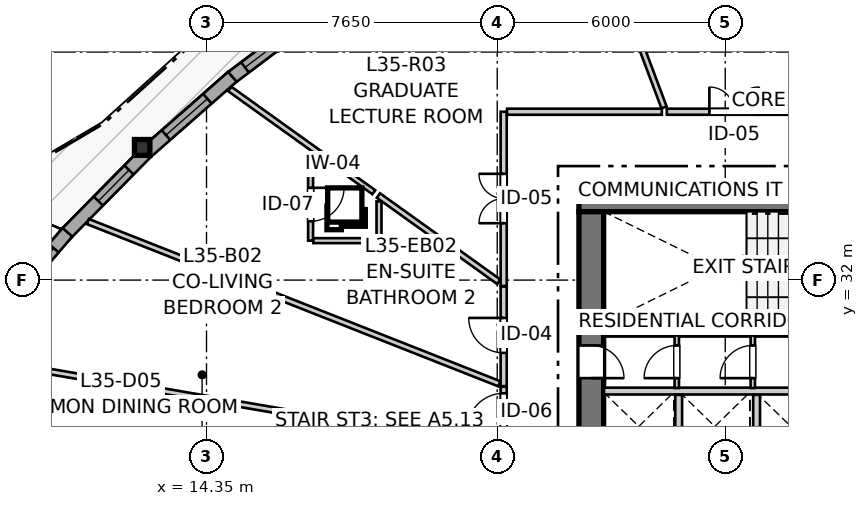
"""IFC4 building model, lengths in metres.
Left out: names, types, materials, properties, quantities, classifications, styles, units other than length and angle.
Written with IfcOpenShell. Run it as: python <this file> out.ifc"""

import sys

from ifc_helpers import new_model, si_unit, direction, frame, frame_2d, origin, origin_2d, place, context, subcontext, project, spatial, rectangle, i_section, extrude, source, transform, mapped, element, fill, save


model = new_model("IFC4")
c1 = context("Model", 3, precision=1e-05, world=origin(), true_north=direction((0.0, 1.0)))
c2 = subcontext(c1, "Body", "Model", "MODEL_VIEW")
j1 = project(units=[si_unit("LENGTHUNIT", "METRE"), si_unit("PLANEANGLEUNIT", "RADIAN")], contexts=[c1])
p1 = place(None, origin())
s1 = spatial("IfcSite", under=j1, at=p1, CompositionType="ELEMENT")
p2 = place(p1, origin())
s2 = spatial("IfcBuilding", under=s1, at=p2, CompositionType="ELEMENT")
p3 = place(p2, frame((0.0, 0.0, 118.4)))
s3 = spatial("IfcBuildingStorey", under=s2, at=p3, CompositionType="ELEMENT", Elevation=118.4)
p4 = place(p3, frame((36.55, 34.125, 0.0), z_axis=(0.0, 0.0, 1.0), x_axis=(-1.0, 0.0, 0.0)))
e1 = element("IfcWall", 1, at=p4, inside=s3, PredefinedType="SHEAR", context=c2, shape_type="SweptSolid", body=[
    extrude(rectangle(XDim=12.4, YDim=0.65, at=frame_2d((6.2, 0.0))), origin(), (0.0, 0.0, 1.0), 2.95),
])
p5 = place(p3, frame((24.475, 33.8, 0.0), z_axis=(0.0, 0.0, 1.0), x_axis=(0.0, -1.0, 0.0)))
e2 = element("IfcWall", 2, at=p5, inside=s3, PredefinedType="SHEAR", context=c2, shape_type="SweptSolid", body=[
    extrude(rectangle(XDim=15.6, YDim=0.65, at=frame_2d((7.8, 0.0))), origin(), (0.0, 0.0, 1.0), 2.95),
])
p6 = place(p5, frame((7.05, 0.0, 0.0)))
e3 = element("IfcOpeningElement", 3, at=p6, cuts=e2, PredefinedType="OPENING", context=c2, shape_type="SweptSolid", body=[
    extrude(rectangle(XDim=1.5, YDim=2.15, at=frame_2d((0.75, 1.075))), frame((0.0, 0.335, 0.0), z_axis=(0.0, -1.0, 0.0), x_axis=(1.0, 0.0, 0.0)), (0.0, 0.0, 1.0), 0.67),
])
p7 = place(p5, frame((3.52, 0.0, 0.0)))
e4 = element("IfcOpeningElement", 4, at=p7, cuts=e2, PredefinedType="OPENING", context=c2, shape_type="SweptSolid", body=[
    extrude(rectangle(XDim=0.86, YDim=2.05, at=frame_2d((0.43, 1.025))), frame((0.0, 0.335, 0.0), z_axis=(0.0, -1.0, 0.0), x_axis=(1.0, 0.0, 0.0)), (0.0, 0.0, 1.0), 0.67),
])
p8 = place(p5, frame((11.22, 0.0, 0.0)))
e5 = element("IfcOpeningElement", 5, at=p8, cuts=e2, PredefinedType="OPENING", context=c2, shape_type="SweptSolid", body=[
    extrude(rectangle(XDim=0.86, YDim=2.05, at=frame_2d((0.43, 1.025))), frame((0.0, 0.335, 0.0), z_axis=(0.0, -1.0, 0.0), x_axis=(1.0, 0.0, 0.0)), (0.0, 0.0, 1.0), 0.67),
])
p9 = place(p3, frame((24.8, 30.7, 0.0), z_axis=(0.0, 0.0, 1.0), x_axis=(1.0, 0.0, 0.0)))
e6 = element("IfcWall", 6, at=p9, inside=s3, PredefinedType="SHEAR", context=c2, shape_type="SweptSolid", body=[
    extrude(rectangle(XDim=11.1, YDim=0.3, at=frame_2d((5.55, 0.0))), origin(), (0.0, 0.0, 1.0), 2.95),
])
p10 = place(p9, frame((6.22, 0.0, 0.0)))
e7 = element("IfcOpeningElement", 7, at=p10, cuts=e6, PredefinedType="OPENING", context=c2, shape_type="SweptSolid", body=[
    extrude(rectangle(XDim=0.98, YDim=2.15, at=frame_2d((0.49, 1.075))), frame((0.0, 0.16, 0.0), z_axis=(0.0, -1.0, 0.0), x_axis=(1.0, 0.0, 0.0)), (0.0, 0.0, 1.0), 0.32),
])
p11 = place(p9, frame((9.15, 0.0, 0.0)))
e8 = element("IfcOpeningElement", 8, at=p11, cuts=e6, PredefinedType="OPENING", context=c2, shape_type="SweptSolid", body=[
    extrude(rectangle(XDim=1.15, YDim=2.15, at=frame_2d((0.575, 1.075))), frame((0.0, 0.16, 0.0), z_axis=(0.0, -1.0, 0.0), x_axis=(1.0, 0.0, 0.0)), (0.0, 0.0, 1.0), 0.32),
])
m1 = source(origin(), c2, "Body", "SweptSolid", [
    extrude(i_section(OverallWidth=0.406, OverallDepth=0.416, WebThickness=0.027, FlangeThickness=0.044, FilletRadius=0.015, at=origin_2d()), origin(), (0.0, 0.0, 1.0), 2.95),
])
p12 = place(p3, frame((12.657, 35.491, 0.0), z_axis=(0.0, 0.0, 1.0), x_axis=(1.0, 0.0, 0.0)))
e9 = element("IfcColumn", 9, at=p12, inside=s3, PredefinedType="PILASTER", context=c2, shape_type="MappedRepresentation", body=[
    mapped(m1, transform((0.0, 0.0, 0.0), x_axis=(1.0, 0.0, 0.0), y_axis=(0.0, 1.0, 0.0), z_axis=(0.0, 0.0, 1.0), scale=1.0)),
])
p13 = place(p3, frame((17.154, 38.947, 0.0), z_axis=(0.0, 0.0, 1.0), x_axis=(-0.798332692302, -0.602216665663, 0.0)))
e10 = element("IfcWall", 10, at=p13, inside=s3, PredefinedType="SOLIDWALL", context=c2, shape_type="SweptSolid", body=[
    extrude(rectangle(XDim=2.746, YDim=0.34, at=frame_2d((1.373, 0.0))), origin(), (0.0, 0.0, 1.0), 2.48),
])
p14 = place(p13, frame((0.493, 0.0, 0.82)))
e11 = element("IfcOpeningElement", 11, at=p14, cuts=e10, PredefinedType="OPENING", context=c2, shape_type="SweptSolid", body=[
    extrude(rectangle(XDim=1.75, YDim=1.3, at=frame_2d((0.875, 0.65))), frame((0.0, 0.18, 0.0), z_axis=(0.0, -1.0, 0.0), x_axis=(1.0, 0.0, 0.0)), (0.0, 0.0, 1.0), 0.36),
])
p15 = place(p3, frame((15.031, 37.349, 0.0), z_axis=(0.0, 0.0, 1.0), x_axis=(-0.751472812955, -0.659764057364, 0.0)))
e12 = element("IfcWall", 12, at=p15, inside=s3, PredefinedType="SOLIDWALL", context=c2, shape_type="SweptSolid", body=[
    extrude(rectangle(XDim=2.99, YDim=0.34, at=frame_2d((1.495, 0.0))), origin(), (0.0, 0.0, 1.0), 2.48),
])
p16 = place(p15, frame((0.875, 0.0, 0.82)))
e13 = element("IfcOpeningElement", 13, at=p16, cuts=e12, PredefinedType="OPENING", context=c2, shape_type="SweptSolid", body=[
    extrude(rectangle(XDim=1.45, YDim=1.25, at=frame_2d((0.725, 0.625))), frame((0.0, 0.18, 0.0), z_axis=(0.0, -1.0, 0.0), x_axis=(1.0, 0.0, 0.0)), (0.0, 0.0, 1.0), 0.36),
])
p17 = place(p3, frame((12.764, 35.357, 0.0), z_axis=(0.0, 0.0, 1.0), x_axis=(-0.701906045867, -0.712269543625, 0.0)))
e14 = element("IfcWall", 14, at=p17, inside=s3, PredefinedType="SOLIDWALL", context=c2, shape_type="SweptSolid", body=[
    extrude(rectangle(XDim=3.039, YDim=0.34, at=frame_2d((1.52, 0.0))), origin(), (0.0, 0.0, 1.0), 2.48),
])
p18 = place(p17, frame((0.646, 0.0, 0.82)))
e15 = element("IfcOpeningElement", 15, at=p18, cuts=e14, PredefinedType="OPENING", context=c2, shape_type="SweptSolid", body=[
    extrude(rectangle(XDim=1.15, YDim=1.2, at=frame_2d((0.575, 0.6))), frame((0.0, 0.18, 0.0), z_axis=(0.0, -1.0, 0.0), x_axis=(1.0, 0.0, 0.0)), (0.0, 0.0, 1.0), 0.36),
])
p19 = place(p3, frame((10.69, 33.257, 0.0), z_axis=(0.0, 0.0, 1.0), x_axis=(-0.650763576187, -0.759280427714, 0.0)))
e16 = element("IfcWall", 16, at=p19, inside=s3, PredefinedType="SOLIDWALL", context=c2, shape_type="SweptSolid", body=[
    extrude(rectangle(XDim=2.893, YDim=0.34, at=frame_2d((1.447, 0.0))), origin(), (0.0, 0.0, 1.0), 2.48),
])
p20 = place(p19, frame((0.552, 0.0, 0.82)))
e17 = element("IfcOpeningElement", 17, at=p20, cuts=e16, PredefinedType="OPENING", context=c2, shape_type="SweptSolid", body=[
    extrude(rectangle(XDim=1.8, YDim=1.45, at=frame_2d((0.9, 0.725))), frame((0.0, 0.18, 0.0), z_axis=(0.0, -1.0, 0.0), x_axis=(1.0, 0.0, 0.0)), (0.0, 0.0, 1.0), 0.36),
])
p21 = place(p3, frame((24.81, 29.08, 0.0), z_axis=(0.0, 0.0, 1.0), x_axis=(1.0, 0.0, 0.0)))
e18 = element("IfcWall", 18, at=p21, inside=s3, PredefinedType="PARTITIONING", context=c2, shape_type="SweptSolid", body=[
    extrude(rectangle(XDim=5.84, YDim=0.18, at=frame_2d((2.92, 0.0))), origin(), (0.0, 0.0, 1.0), 2.95),
])
for number, where, z_axis, x_axis in (
    (19, (26.775, 27.2, 0.0), (0.0, 0.0, 1.0), (0.0, 1.0, 0.0)),
    (20, (28.825, 27.2, 0.0), (0.0, 0.0, 1.0), (0.0, 1.0, 0.0)),
):
    element("IfcWall", number, at=place(p3, frame(where, z_axis=z_axis, x_axis=x_axis)), inside=s3, PredefinedType="PARTITIONING", context=c2, shape_type="SweptSolid", body=[
        extrude(rectangle(XDim=1.78, YDim=0.18, at=frame_2d((0.89, 0.0))), origin(), (0.0, 0.0, 1.0), 2.95),
    ])
p22 = place(p3, frame((26.725, 29.16, 0.0), z_axis=(0.0, 0.0, 1.0), x_axis=(0.0, 1.0, 0.0)))
e21 = element("IfcWall", 21, at=p22, inside=s3, PredefinedType="PARTITIONING", context=c2, shape_type="SweptSolid", body=[
    extrude(rectangle(XDim=1.38, YDim=0.115, at=frame_2d((0.69, 0.0))), origin(), (0.0, 0.0, 1.0), 2.95),
])
p23 = place(p22, frame((0.26, 0.0, 0.0)))
e22 = element("IfcOpeningElement", 22, at=p23, cuts=e21, PredefinedType="OPENING", context=c2, shape_type="SweptSolid", body=[
    extrude(rectangle(XDim=0.86, YDim=2.05, at=frame_2d((0.43, 1.025))), frame((0.0, 0.067, 0.0), z_axis=(0.0, -1.0, 0.0), x_axis=(1.0, 0.0, 0.0)), (0.0, 0.0, 1.0), 0.135),
])
p24 = place(p3, frame((28.725, 29.16, 0.0), z_axis=(0.0, 0.0, 1.0), x_axis=(0.0, 1.0, 0.0)))
e23 = element("IfcWall", 23, at=p24, inside=s3, PredefinedType="PARTITIONING", context=c2, shape_type="SweptSolid", body=[
    extrude(rectangle(XDim=1.38, YDim=0.115, at=frame_2d((0.69, 0.0))), origin(), (0.0, 0.0, 1.0), 2.95),
])
p25 = place(p24, frame((0.26, 0.0, 0.0)))
e24 = element("IfcOpeningElement", 24, at=p25, cuts=e23, PredefinedType="OPENING", context=c2, shape_type="SweptSolid", body=[
    extrude(rectangle(XDim=0.86, YDim=2.05, at=frame_2d((0.43, 1.025))), frame((0.0, 0.067, 0.0), z_axis=(0.0, -1.0, 0.0), x_axis=(1.0, 0.0, 0.0)), (0.0, 0.0, 1.0), 0.135),
])
p26 = place(p3, frame((22.17, 31.844, 0.0), z_axis=(0.0, 0.0, 1.0), x_axis=(0.0, 1.0, 0.0)))
e25 = element("IfcWall", 25, at=p26, inside=s3, PredefinedType="PARTITIONING", context=c2, shape_type="SweptSolid", body=[
    extrude(rectangle(XDim=4.586, YDim=0.16, at=frame_2d((2.293, 0.0))), origin(), (0.0, 0.0, 1.0), 2.95),
])
p27 = place(p26, frame((1.653, 0.0, 0.0)))
e26 = element("IfcOpeningElement", 26, at=p27, cuts=e25, PredefinedType="OPENING", context=c2, shape_type="SweptSolid", body=[
    extrude(rectangle(XDim=1.3, YDim=2.1, at=frame_2d((0.65, 1.05))), frame((0.0, 0.09, 0.0), z_axis=(0.0, -1.0, 0.0), x_axis=(1.0, 0.0, 0.0)), (0.0, 0.0, 1.0), 0.18),
])
p28 = place(p3, frame((26.463, 36.43, 0.0), z_axis=(0.0, 0.0, 1.0), x_axis=(1.0, 0.0, 0.0)))
e27 = element("IfcWall", 27, at=p28, inside=s3, PredefinedType="PARTITIONING", context=c2, shape_type="SweptSolid", body=[
    extrude(rectangle(XDim=3.585, YDim=0.16, at=frame_2d((1.792, 0.0))), origin(), (0.0, 0.0, 1.0), 2.95),
])
p29 = place(p28, frame((1.119, 0.0, 0.0)))
e28 = element("IfcOpeningElement", 28, at=p29, cuts=e27, PredefinedType="OPENING", context=c2, shape_type="SweptSolid", body=[
    extrude(rectangle(XDim=1.3, YDim=2.1, at=frame_2d((0.65, 1.05))), frame((0.0, 0.09, 0.0), z_axis=(0.0, -1.0, 0.0), x_axis=(1.0, 0.0, 0.0)), (0.0, 0.0, 1.0), 0.18),
])
p30 = place(p3, frame((22.17, 29.209, 0.0), z_axis=(0.0, 0.0, 1.0), x_axis=(0.0, 1.0, 0.0)))
e29 = element("IfcWall", 29, at=p30, inside=s3, PredefinedType="PARTITIONING", context=c2, shape_type="SweptSolid", body=[
    extrude(rectangle(XDim=2.62, YDim=0.16, at=frame_2d((1.31, 0.0))), origin(), (0.0, 0.0, 1.0), 2.95),
])
p31 = place(p30, frame((0.875, 0.0, 0.0)))
e30 = element("IfcOpeningElement", 30, at=p31, cuts=e29, PredefinedType="OPENING", context=c2, shape_type="SweptSolid", body=[
    extrude(rectangle(XDim=0.92, YDim=2.1, at=frame_2d((0.46, 1.05))), frame((0.0, 0.09, 0.0), z_axis=(0.0, -1.0, 0.0), x_axis=(1.0, 0.0, 0.0)), (0.0, 0.0, 1.0), 0.18),
])
p32 = place(p3, frame((17.089, 34.938, 0.0), z_axis=(0.0, 0.0, 1.0), x_axis=(0.0, -1.0, 0.0)))
e31 = element("IfcWall", 31, at=p32, inside=s3, PredefinedType="PARTITIONING", context=c2, shape_type="SweptSolid", body=[
    extrude(rectangle(XDim=1.9, YDim=0.13, at=frame_2d((0.95, 0.0))), origin(), (0.0, 0.0, 1.0), 2.95),
])
p33 = place(p32, frame((0.51, 0.0, 0.0)))
e32 = element("IfcOpeningElement", 32, at=p33, cuts=e31, PredefinedType="OPENING", context=c2, shape_type="SweptSolid", body=[
    extrude(rectangle(XDim=0.88, YDim=2.05, at=frame_2d((0.44, 1.025))), frame((0.0, 0.075, 0.0), z_axis=(0.0, -1.0, 0.0), x_axis=(1.0, 0.0, 0.0)), (0.0, 0.0, 1.0), 0.15),
])
p34 = place(p3, frame((22.17, 27.85, 0.0), z_axis=(0.0, 0.0, 1.0), x_axis=(0.0, 1.0, 0.0)))
e33 = element("IfcWall", 33, at=p34, inside=s3, PredefinedType="PARTITIONING", context=c2, shape_type="SweptSolid", body=[
    extrude(rectangle(XDim=1.344, YDim=0.16, at=frame_2d((0.672, 0.0))), origin(), (0.0, 0.0, 1.0), 2.95),
])
p35 = place(p34, frame((0.211, 0.0, 0.0)))
e34 = element("IfcOpeningElement", 34, at=p35, cuts=e33, PredefinedType="OPENING", context=c2, shape_type="SweptSolid", body=[
    extrude(rectangle(XDim=0.96, YDim=2.1, at=frame_2d((0.48, 1.05))), frame((0.0, 0.09, 0.0), z_axis=(0.0, -1.0, 0.0), x_axis=(1.0, 0.0, 0.0)), (0.0, 0.0, 1.0), 0.18),
])
p36 = place(p3, frame((7.893, 29.996, 0.0), z_axis=(0.0, 0.0, 1.0), x_axis=(0.985544917876, -0.169414328938, 0.0)))
e35 = element("IfcWall", 35, at=p36, inside=s3, PredefinedType="PARTITIONING", context=c2, shape_type="SweptSolid", body=[
    extrude(rectangle(XDim=12.664, YDim=0.145, at=frame_2d((6.332, 0.0))), origin(), (0.0, 0.0, 1.0), 2.95),
])
p37 = place(p3, frame((11.228, 33.54, 0.0), z_axis=(0.0, 0.0, 1.0), x_axis=(0.930301058265, -0.366796866114, 0.0)))
e36 = element("IfcWall", 36, at=p37, inside=s3, PredefinedType="PARTITIONING", context=c2, shape_type="SweptSolid", body=[
    extrude(rectangle(XDim=11.639, YDim=0.145, at=frame_2d((5.82, 0.0))), origin(), (0.0, 0.0, 1.0), 2.95),
])
p38 = place(p3, frame((24.107, 42.621, 0.0), z_axis=(0.0, 0.0, 1.0), x_axis=(0.351605509999, -0.93614826034, 0.0)))
e37 = element("IfcWall", 37, at=p38, inside=s3, PredefinedType="PARTITIONING", context=c2, shape_type="SweptSolid", body=[
    extrude(rectangle(XDim=6.493, YDim=0.145, at=frame_2d((3.247, 0.0))), origin(), (0.0, 0.0, 1.0), 2.95),
])
p39 = place(p3, frame((22.258, 36.43, 0.0), z_axis=(0.0, 0.0, 1.0), x_axis=(1.0, 0.0, 0.0)))
e38 = element("IfcWall", 38, at=p39, inside=s3, PredefinedType="PARTITIONING", context=c2, shape_type="SweptSolid", body=[
    extrude(rectangle(XDim=4.074, YDim=0.16, at=frame_2d((2.037, 0.0))), origin(), (0.0, 0.0, 1.0), 2.588),
])
p40 = place(p3, frame((18.874, 34.225, 0.0), z_axis=(0.0, 0.0, 1.0), x_axis=(0.812826521731, -0.582505833079, 0.0)))
e39 = element("IfcWall", 39, at=p40, inside=s3, PredefinedType="PARTITIONING", context=c2, shape_type="SweptSolid", body=[
    extrude(rectangle(XDim=3.896, YDim=0.145, at=frame_2d((1.948, 0.0))), origin(), (0.0, 0.0, 1.0), 2.95),
])
p41 = place(p3, frame((14.961, 37.03, 0.0), z_axis=(0.0, 0.0, 1.0), x_axis=(0.812838437321, -0.582489205748, 0.0)))
e40 = element("IfcWall", 40, at=p41, inside=s3, PredefinedType="PARTITIONING", context=c2, shape_type="SweptSolid", body=[
    extrude(rectangle(XDim=3.616, YDim=0.145, at=frame_2d((1.808, 0.0))), origin(), (0.0, 0.0, 1.0), 2.95),
])
p42 = place(p3, frame((17.162, 33.038, 0.0), z_axis=(0.0, 0.0, 1.0), x_axis=(1.0, 0.0, 0.0)))
e41 = element("IfcWall", 41, at=p42, inside=s3, PredefinedType="PARTITIONING", context=c2, shape_type="SweptSolid", body=[
    extrude(rectangle(XDim=1.727, YDim=0.13, at=frame_2d((0.863, 0.0))), origin(), (0.0, 0.0, 1.0), 2.95),
])
p43 = place(p3, frame((18.889, 33.111, 0.0), z_axis=(0.0, 0.0, 1.0), x_axis=(0.0, 1.0, 0.0)))
e42 = element("IfcWall", 42, at=p43, inside=s3, PredefinedType="PARTITIONING", context=c2, shape_type="SweptSolid", body=[
    extrude(rectangle(XDim=0.96, YDim=0.13, at=frame_2d((0.48, 0.0))), origin(), (0.0, 0.0, 1.0), 2.95),
])
p44 = place(p3, frame((17.913, 34.914, 0.0), z_axis=(0.0, 0.0, 1.0), x_axis=(0.812774229327, -0.582578794792, 0.0)))
e43 = element("IfcWall", 43, at=p44, inside=s3, PredefinedType="PARTITIONING", context=c2, shape_type="SweptSolid", body=[
    extrude(rectangle(XDim=1.033, YDim=0.13, at=frame_2d((0.517, 0.0))), origin(), (0.0, 0.0, 1.0), 2.95),
])
p45 = place(p3, frame((17.162, 34.938, 0.0), z_axis=(0.0, 0.0, 1.0), x_axis=(1.0, 0.0, 0.0)))
e44 = element("IfcWall", 44, at=p45, inside=s3, PredefinedType="PARTITIONING", context=c2, shape_type="SweptSolid", body=[
    extrude(rectangle(XDim=0.495, YDim=0.13, at=frame_2d((0.247, 0.0))), origin(), (0.0, 0.0, 1.0), 2.95),
])
m2 = source(origin(), c2, "Body", "SweptSolid", [
    extrude(rectangle(XDim=1.75, YDim=1.3, at=frame_2d((0.875, 0.65))), frame((0.0, 0.03, 0.0), z_axis=(0.0, -1.0, 0.0), x_axis=(1.0, 0.0, 0.0)), (0.0, 0.0, 1.0), 0.06),
])
p46 = place(p14, origin())
e45 = element("IfcWindow", 45, at=p46, inside=s3, PartitioningType="SINGLE_PANEL", PredefinedType="WINDOW", context=c2, shape_type="MappedRepresentation", body=[
    mapped(m2, transform((0.0, 0.0, 0.0), x_axis=(1.0, 0.0, 0.0), y_axis=(0.0, 1.0, 0.0), z_axis=(0.0, 0.0, 1.0), scale=1.0)),
])
fill(e11, e45)
m3 = source(origin(), c2, "Body", "SweptSolid", [
    extrude(rectangle(XDim=1.45, YDim=1.25, at=frame_2d((0.725, 0.625))), frame((0.0, 0.03, 0.0), z_axis=(0.0, -1.0, 0.0), x_axis=(1.0, 0.0, 0.0)), (0.0, 0.0, 1.0), 0.06),
])
p47 = place(p16, origin())
e46 = element("IfcWindow", 46, at=p47, inside=s3, PartitioningType="SINGLE_PANEL", PredefinedType="WINDOW", context=c2, shape_type="MappedRepresentation", body=[
    mapped(m3, transform((0.0, 0.0, 0.0), x_axis=(1.0, 0.0, 0.0), y_axis=(0.0, 1.0, 0.0), z_axis=(0.0, 0.0, 1.0), scale=1.0)),
])
fill(e13, e46)
m4 = source(origin(), c2, "Body", "SweptSolid", [
    extrude(rectangle(XDim=1.15, YDim=1.2, at=frame_2d((0.575, 0.6))), frame((0.0, 0.03, 0.0), z_axis=(0.0, -1.0, 0.0), x_axis=(1.0, 0.0, 0.0)), (0.0, 0.0, 1.0), 0.06),
])
p48 = place(p18, origin())
e47 = element("IfcWindow", 47, at=p48, inside=s3, PartitioningType="SINGLE_PANEL", PredefinedType="WINDOW", context=c2, shape_type="MappedRepresentation", body=[
    mapped(m4, transform((0.0, 0.0, 0.0), x_axis=(1.0, 0.0, 0.0), y_axis=(0.0, 1.0, 0.0), z_axis=(0.0, 0.0, 1.0), scale=1.0)),
])
fill(e15, e47)
m5 = source(origin(), c2, "Body", "SweptSolid", [
    extrude(rectangle(XDim=1.8, YDim=1.45, at=frame_2d((0.9, 0.725))), frame((0.0, 0.03, 0.0), z_axis=(0.0, -1.0, 0.0), x_axis=(1.0, 0.0, 0.0)), (0.0, 0.0, 1.0), 0.06),
])
p49 = place(p20, origin())
e48 = element("IfcWindow", 48, at=p49, inside=s3, PartitioningType="SINGLE_PANEL", PredefinedType="WINDOW", context=c2, shape_type="MappedRepresentation", body=[
    mapped(m5, transform((0.0, 0.0, 0.0), x_axis=(1.0, 0.0, 0.0), y_axis=(0.0, 1.0, 0.0), z_axis=(0.0, 0.0, 1.0), scale=1.0)),
])
fill(e17, e48)
m6 = source(origin(), c2, "Body", "SweptSolid", [
    extrude(rectangle(XDim=0.86, YDim=2.05, at=frame_2d((0.43, 1.025))), frame((0.0, 0.025, 0.0), z_axis=(0.0, -1.0, 0.0), x_axis=(1.0, 0.0, 0.0)), (0.0, 0.0, 1.0), 0.05),
])
p50 = place(p7, origin())
e49 = element("IfcDoor", 49, at=p50, inside=s3, OperationType="SINGLE_SWING_RIGHT", PredefinedType="DOOR", context=c2, shape_type="MappedRepresentation", body=[
    mapped(m6, transform((0.0, 0.0, 0.0), x_axis=(1.0, 0.0, 0.0), y_axis=(0.0, 1.0, 0.0), z_axis=(0.0, 0.0, 1.0), scale=1.0)),
])
fill(e4, e49)
p51 = place(p23, origin())
e50 = element("IfcDoor", 50, at=p51, inside=s3, OperationType="SINGLE_SWING_LEFT", PredefinedType="DOOR", context=c2, shape_type="MappedRepresentation", body=[
    mapped(m6, transform((0.0, 0.0, 0.0), x_axis=(1.0, 0.0, 0.0), y_axis=(0.0, 1.0, 0.0), z_axis=(0.0, 0.0, 1.0), scale=1.0)),
])
fill(e22, e50)
p52 = place(p25, origin())
e51 = element("IfcDoor", 51, at=p52, inside=s3, OperationType="SINGLE_SWING_LEFT", PredefinedType="DOOR", context=c2, shape_type="MappedRepresentation", body=[
    mapped(m6, transform((0.0, 0.0, 0.0), x_axis=(1.0, 0.0, 0.0), y_axis=(0.0, 1.0, 0.0), z_axis=(0.0, 0.0, 1.0), scale=1.0)),
])
fill(e24, e51)
m7 = source(origin(), c2, "Body", "SweptSolid", [
    extrude(rectangle(XDim=1.3, YDim=2.1, at=frame_2d((0.65, 1.05))), frame((0.0, 0.025, 0.0), z_axis=(0.0, -1.0, 0.0), x_axis=(1.0, 0.0, 0.0)), (0.0, 0.0, 1.0), 0.05),
])
p53 = place(p27, origin())
e52 = element("IfcDoor", 52, at=p53, inside=s3, OperationType="DOUBLE_DOOR_SINGLE_SWING", PredefinedType="DOOR", context=c2, shape_type="MappedRepresentation", body=[
    mapped(m7, transform((0.0, 0.0, 0.0), x_axis=(1.0, 0.0, 0.0), y_axis=(0.0, 1.0, 0.0), z_axis=(0.0, 0.0, 1.0), scale=1.0)),
])
fill(e26, e52)
p54 = place(p29, origin())
e53 = element("IfcDoor", 53, at=p54, inside=s3, OperationType="DOUBLE_DOOR_SINGLE_SWING", PredefinedType="DOOR", context=c2, shape_type="MappedRepresentation", body=[
    mapped(m7, transform((0.0, 0.0, 0.0), x_axis=(1.0, 0.0, 0.0), y_axis=(0.0, 1.0, 0.0), z_axis=(0.0, 0.0, 1.0), scale=1.0)),
])
fill(e28, e53)
m8 = source(origin(), c2, "Body", "SweptSolid", [
    extrude(rectangle(XDim=0.92, YDim=2.1, at=frame_2d((0.46, 1.05))), frame((0.0, 0.025, 0.0), z_axis=(0.0, -1.0, 0.0), x_axis=(1.0, 0.0, 0.0)), (0.0, 0.0, 1.0), 0.05),
])
p55 = place(p31, origin())
e54 = element("IfcDoor", 54, at=p55, inside=s3, OperationType="SINGLE_SWING_RIGHT", PredefinedType="DOOR", context=c2, shape_type="MappedRepresentation", body=[
    mapped(m8, transform((0.0, 0.0, 0.0), x_axis=(1.0, 0.0, 0.0), y_axis=(0.0, 1.0, 0.0), z_axis=(0.0, 0.0, 1.0), scale=1.0)),
])
fill(e30, e54)
m9 = source(origin(), c2, "Body", "SweptSolid", [
    extrude(rectangle(XDim=0.88, YDim=2.05, at=frame_2d((0.44, 1.025))), frame((0.0, 0.025, 0.0), z_axis=(0.0, -1.0, 0.0), x_axis=(1.0, 0.0, 0.0)), (0.0, 0.0, 1.0), 0.05),
])
p56 = place(p33, origin())
e55 = element("IfcDoor", 55, at=p56, inside=s3, OperationType="SINGLE_SWING_LEFT", PredefinedType="DOOR", context=c2, shape_type="MappedRepresentation", body=[
    mapped(m9, transform((0.0, 0.0, 0.0), x_axis=(1.0, 0.0, 0.0), y_axis=(0.0, 1.0, 0.0), z_axis=(0.0, 0.0, 1.0), scale=1.0)),
])
fill(e32, e55)
m10 = source(origin(), c2, "Body", "SweptSolid", [
    extrude(rectangle(XDim=0.96, YDim=2.1, at=frame_2d((0.48, 1.05))), frame((0.0, 0.025, 0.0), z_axis=(0.0, -1.0, 0.0), x_axis=(1.0, 0.0, 0.0)), (0.0, 0.0, 1.0), 0.05),
])
p57 = place(p35, origin())
e56 = element("IfcDoor", 56, at=p57, inside=s3, OperationType="SINGLE_SWING_LEFT", PredefinedType="DOOR", context=c2, shape_type="MappedRepresentation", body=[
    mapped(m10, transform((0.0, 0.0, 0.0), x_axis=(1.0, 0.0, 0.0), y_axis=(0.0, 1.0, 0.0), z_axis=(0.0, 0.0, 1.0), scale=1.0)),
])
fill(e34, e56)
save(model, sys.argv[1])
